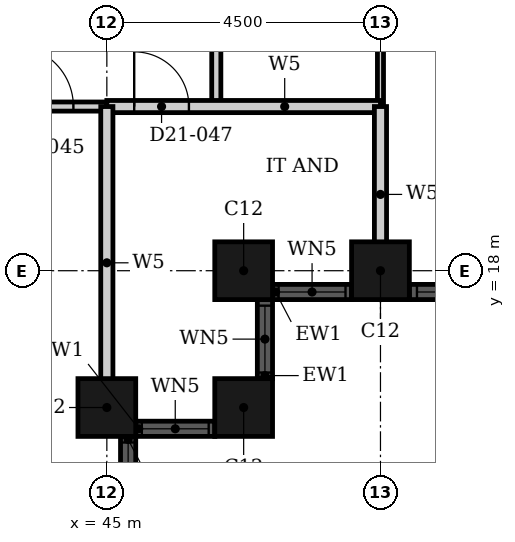
"""IFC4 building model, lengths in metres.
Left out: names, types, materials, properties, quantities, classifications, styles, units other than length and angle.
Written with IfcOpenShell. Run it as: python <this file> out.ifc"""

import sys

from ifc_helpers import new_model, si_unit, direction, frame, frame_2d, origin, origin_2d, place, context, subcontext, project, spatial, rectangle, hollow_rectangle, extrude, element, fill, save


model = new_model("IFC4")
c1 = context("Model", 3, precision=1e-05, world=origin(), true_north=direction((0.0, 1.0)))
c2 = subcontext(c1, "Body", "Model", "MODEL_VIEW")
j1 = project(units=[si_unit("LENGTHUNIT", "METRE"), si_unit("PLANEANGLEUNIT", "RADIAN")], contexts=[c1])
p1 = place(None, origin())
s1 = spatial("IfcSite", under=j1, at=p1, CompositionType="ELEMENT")
p2 = place(p1, origin())
s2 = spatial("IfcBuilding", under=s1, at=p2, CompositionType="ELEMENT")
p3 = place(p2, frame((0.0, 0.0, 88.8)))
s3 = spatial("IfcBuildingStorey", under=s2, at=p3, CompositionType="ELEMENT", Elevation=88.8)
for number, where, z_axis, x_axis in (
    (1, (45.0, 15.75, 0.0), (0.0, 0.0, 1.0), (1.0, 0.0, 0.0)),
    (2, (47.25, 15.75, 0.0), (0.0, 0.0, 1.0), (1.0, 0.0, 0.0)),
    (3, (47.25, 18.0, 0.0), (0.0, 0.0, 1.0), (1.0, 0.0, 0.0)),
    (4, (49.5, 18.0, 0.0), (0.0, 0.0, 1.0), (1.0, 0.0, 0.0)),
):
    element("IfcColumn", number, at=place(p3, frame(where, z_axis=z_axis, x_axis=x_axis)), inside=s3, PredefinedType="COLUMN", context=c2, shape_type="SweptSolid", body=[
        extrude(hollow_rectangle(XDim=0.95, YDim=0.95, WallThickness=0.03, at=origin_2d()), origin(), (0.0, 0.0, 1.0), 3.6),
    ])
p4 = place(p3, frame((45.35, 13.975, 0.0), z_axis=(0.0, 0.0, 1.0), x_axis=(0.0, 1.0, 0.0)))
e5 = element("IfcWall", 5, at=p4, inside=s3, PredefinedType="SOLIDWALL", context=c2, shape_type="SweptSolid", body=[
    extrude(rectangle(XDim=1.3, YDim=0.25, at=frame_2d((0.65, 0.0))), origin(), (0.0, 0.0, 1.0), 3.6),
])
p5 = place(p4, frame((0.1, 0.0, 0.9)))
e6 = element("IfcOpeningElement", 6, at=p5, cuts=e5, PredefinedType="OPENING", context=c2, shape_type="SweptSolid", body=[
    extrude(rectangle(XDim=1.1, YDim=2.08, at=frame_2d((0.55, 1.04))), frame((0.0, 0.135, 0.0), z_axis=(0.0, -1.0, 0.0), x_axis=(1.0, 0.0, 0.0)), (0.0, 0.0, 1.0), 0.27),
])
p6 = place(p3, frame((45.475, 15.4, 0.0), z_axis=(0.0, 0.0, 1.0), x_axis=(1.0, 0.0, 0.0)))
e7 = element("IfcWall", 7, at=p6, inside=s3, PredefinedType="SOLIDWALL", context=c2, shape_type="SweptSolid", body=[
    extrude(rectangle(XDim=1.3, YDim=0.25, at=frame_2d((0.65, 0.0))), origin(), (0.0, 0.0, 1.0), 3.6),
])
p7 = place(p6, frame((0.1, 0.0, 0.9)))
e8 = element("IfcOpeningElement", 8, at=p7, cuts=e7, PredefinedType="OPENING", context=c2, shape_type="SweptSolid", body=[
    extrude(rectangle(XDim=1.1, YDim=2.08, at=frame_2d((0.55, 1.04))), frame((0.0, 0.135, 0.0), z_axis=(0.0, -1.0, 0.0), x_axis=(1.0, 0.0, 0.0)), (0.0, 0.0, 1.0), 0.27),
])
p8 = place(p3, frame((47.6, 16.225, 0.0), z_axis=(0.0, 0.0, 1.0), x_axis=(0.0, 1.0, 0.0)))
e9 = element("IfcWall", 9, at=p8, inside=s3, PredefinedType="SOLIDWALL", context=c2, shape_type="SweptSolid", body=[
    extrude(rectangle(XDim=1.3, YDim=0.25, at=frame_2d((0.65, 0.0))), origin(), (0.0, 0.0, 1.0), 3.6),
])
p9 = place(p8, frame((0.1, 0.0, 0.9)))
e10 = element("IfcOpeningElement", 10, at=p9, cuts=e9, PredefinedType="OPENING", context=c2, shape_type="SweptSolid", body=[
    extrude(rectangle(XDim=1.1, YDim=2.08, at=frame_2d((0.55, 1.04))), frame((0.0, 0.135, 0.0), z_axis=(0.0, -1.0, 0.0), x_axis=(1.0, 0.0, 0.0)), (0.0, 0.0, 1.0), 0.27),
])
p10 = place(p3, frame((47.725, 17.65, 0.0), z_axis=(0.0, 0.0, 1.0), x_axis=(1.0, 0.0, 0.0)))
e11 = element("IfcWall", 11, at=p10, inside=s3, PredefinedType="SOLIDWALL", context=c2, shape_type="SweptSolid", body=[
    extrude(rectangle(XDim=1.3, YDim=0.25, at=frame_2d((0.65, 0.0))), origin(), (0.0, 0.0, 1.0), 3.6),
])
p11 = place(p10, frame((0.1, 0.0, 0.9)))
e12 = element("IfcOpeningElement", 12, at=p11, cuts=e11, PredefinedType="OPENING", context=c2, shape_type="SweptSolid", body=[
    extrude(rectangle(XDim=1.1, YDim=2.08, at=frame_2d((0.55, 1.04))), frame((0.0, 0.135, 0.0), z_axis=(0.0, -1.0, 0.0), x_axis=(1.0, 0.0, 0.0)), (0.0, 0.0, 1.0), 0.27),
])
p12 = place(p3, frame((49.975, 17.65, 0.0), z_axis=(0.0, 0.0, 1.0), x_axis=(1.0, 0.0, 0.0)))
e13 = element("IfcWall", 13, at=p12, inside=s3, PredefinedType="SOLIDWALL", context=c2, shape_type="SweptSolid", body=[
    extrude(rectangle(XDim=8.05, YDim=0.25, at=frame_2d((4.025, 0.0))), origin(), (0.0, 0.0, 1.0), 3.6),
])
p13 = place(p12, frame((0.125, 0.0, 0.9)))
e14 = element("IfcOpeningElement", 14, at=p13, cuts=e13, PredefinedType="OPENING", context=c2, shape_type="SweptSolid", body=[
    extrude(rectangle(XDim=3.3, YDim=2.08, at=frame_2d((1.65, 1.04))), frame((0.0, 0.135, 0.0), z_axis=(0.0, -1.0, 0.0), x_axis=(1.0, 0.0, 0.0)), (0.0, 0.0, 1.0), 0.27),
])
p14 = place(p12, frame((4.625, 0.0, 0.9)))
e15 = element("IfcOpeningElement", 15, at=p14, cuts=e13, PredefinedType="OPENING", context=c2, shape_type="SweptSolid", body=[
    extrude(rectangle(XDim=3.3, YDim=2.08, at=frame_2d((1.65, 1.04))), frame((0.0, 0.135, 0.0), z_axis=(0.0, -1.0, 0.0), x_axis=(1.0, 0.0, 0.0)), (0.0, 0.0, 1.0), 0.27),
])
p15 = place(p3, frame((31.5, 20.7, 0.0), z_axis=(0.0, 0.0, 1.0), x_axis=(1.0, 0.0, 0.0)))
e16 = element("IfcWall", 16, at=p15, inside=s3, PredefinedType="PARTITIONING", context=c2, shape_type="SweptSolid", body=[
    extrude(rectangle(XDim=13.5, YDim=0.15, at=frame_2d((6.75, 0.0))), origin(), (0.0, 0.0, 1.0), 3.3),
])
p16 = place(p15, frame((11.95, 0.0, 0.0)))
e17 = element("IfcOpeningElement", 17, at=p16, cuts=e16, PredefinedType="OPENING", context=c2, shape_type="SweptSolid", body=[
    extrude(rectangle(XDim=1.0, YDim=2.1, at=frame_2d((0.5, 1.05))), frame((0.0, 0.085, 0.0), z_axis=(0.0, -1.0, 0.0), x_axis=(1.0, 0.0, 0.0)), (0.0, 0.0, 1.0), 0.17),
])
p17 = place(p15, frame((1.05, 0.0, 0.0)))
e18 = element("IfcOpeningElement", 18, at=p17, cuts=e16, PredefinedType="OPENING", context=c2, shape_type="SweptSolid", body=[
    extrude(rectangle(XDim=0.9, YDim=2.1, at=frame_2d((0.45, 1.05))), frame((0.0, 0.085, 0.0), z_axis=(0.0, -1.0, 0.0), x_axis=(1.0, 0.0, 0.0)), (0.0, 0.0, 1.0), 0.17),
])
p18 = place(p15, frame((5.55, 0.0, 0.0)))
e19 = element("IfcOpeningElement", 19, at=p18, cuts=e16, PredefinedType="OPENING", context=c2, shape_type="SweptSolid", body=[
    extrude(rectangle(XDim=0.9, YDim=2.1, at=frame_2d((0.45, 1.05))), frame((0.0, 0.085, 0.0), z_axis=(0.0, -1.0, 0.0), x_axis=(1.0, 0.0, 0.0)), (0.0, 0.0, 1.0), 0.17),
])
p19 = place(p3, frame((46.8, 20.7, 0.0), z_axis=(0.0, 0.0, 1.0), x_axis=(0.0, 1.0, 0.0)))
e20 = element("IfcWall", 20, at=p19, inside=s3, PredefinedType="PARTITIONING", context=c2, shape_type="SweptSolid", body=[
    extrude(rectangle(XDim=6.3, YDim=0.15, at=frame_2d((3.15, 0.0))), origin(), (0.0, 0.0, 1.0), 3.3),
])
p20 = place(p19, frame((2.65, 0.0, 0.0)))
e21 = element("IfcOpeningElement", 21, at=p20, cuts=e20, PredefinedType="OPENING", context=c2, shape_type="SweptSolid", body=[
    extrude(rectangle(XDim=0.9, YDim=2.1, at=frame_2d((0.45, 1.05))), frame((0.0, 0.085, 0.0), z_axis=(0.0, -1.0, 0.0), x_axis=(1.0, 0.0, 0.0)), (0.0, 0.0, 1.0), 0.17),
])
p21 = place(p3, frame((49.5, 20.7, 0.0), z_axis=(0.0, 0.0, 1.0), x_axis=(0.0, 1.0, 0.0)))
e22 = element("IfcWall", 22, at=p21, inside=s3, PredefinedType="PARTITIONING", context=c2, shape_type="SweptSolid", body=[
    extrude(rectangle(XDim=6.3, YDim=0.1, at=frame_2d((3.15, 0.0))), origin(), (0.0, 0.0, 1.0), 2.38),
])
p22 = place(p3, frame((45.0, 20.7, 0.0), z_axis=(0.0, 0.0, 1.0), x_axis=(1.0, 0.0, 0.0)))
e23 = element("IfcWall", 23, at=p22, inside=s3, PredefinedType="PARTITIONING", context=c2, shape_type="SweptSolid", body=[
    extrude(rectangle(XDim=4.5, YDim=0.2, at=frame_2d((2.25, 0.0))), origin(), (0.0, 0.0, 1.0), 3.3),
])
p23 = place(p22, frame((0.45, 0.0, 0.0)))
e24 = element("IfcOpeningElement", 24, at=p23, cuts=e23, PredefinedType="OPENING", context=c2, shape_type="SweptSolid", body=[
    extrude(rectangle(XDim=0.9, YDim=2.1, at=frame_2d((0.45, 1.05))), frame((0.0, 0.11, 0.0), z_axis=(0.0, -1.0, 0.0), x_axis=(1.0, 0.0, 0.0)), (0.0, 0.0, 1.0), 0.22),
])
p24 = place(p3, frame((45.0, 15.56, 0.0), z_axis=(0.0, 0.0, 1.0), x_axis=(0.0, 1.0, 0.0)))
e25 = element("IfcWall", 25, at=p24, inside=s3, PredefinedType="PARTITIONING", context=c2, shape_type="SweptSolid", body=[
    extrude(rectangle(XDim=5.14, YDim=0.2, at=frame_2d((2.57, 0.0))), origin(), (0.0, 0.0, 1.0), 3.3),
])
p25 = place(p3, frame((49.5, 17.81, 0.0), z_axis=(0.0, 0.0, 1.0), x_axis=(0.0, 1.0, 0.0)))
e26 = element("IfcWall", 26, at=p25, inside=s3, PredefinedType="PARTITIONING", context=c2, shape_type="SweptSolid", body=[
    extrude(rectangle(XDim=2.89, YDim=0.2, at=frame_2d((1.445, 0.0))), origin(), (0.0, 0.0, 1.0), 2.38),
])
p26 = place(p5, origin())
e27 = element("IfcWindow", 27, at=p26, inside=s3, PartitioningType="SINGLE_PANEL", PredefinedType="WINDOW", context=c2, shape_type="SweptSolid", body=[
    extrude(rectangle(XDim=1.1, YDim=2.08, at=frame_2d((0.55, 1.04))), frame((0.0, 0.03, 0.0), z_axis=(0.0, -1.0, 0.0), x_axis=(1.0, 0.0, 0.0)), (0.0, 0.0, 1.0), 0.06),
])
fill(e6, e27)
p27 = place(p7, origin())
e28 = element("IfcWindow", 28, at=p27, inside=s3, PartitioningType="SINGLE_PANEL", PredefinedType="WINDOW", context=c2, shape_type="SweptSolid", body=[
    extrude(rectangle(XDim=1.1, YDim=2.08, at=frame_2d((0.55, 1.04))), frame((0.0, 0.03, 0.0), z_axis=(0.0, -1.0, 0.0), x_axis=(1.0, 0.0, 0.0)), (0.0, 0.0, 1.0), 0.06),
])
fill(e8, e28)
p28 = place(p9, origin())
e29 = element("IfcWindow", 29, at=p28, inside=s3, PartitioningType="SINGLE_PANEL", PredefinedType="WINDOW", context=c2, shape_type="SweptSolid", body=[
    extrude(rectangle(XDim=1.1, YDim=2.08, at=frame_2d((0.55, 1.04))), frame((0.0, 0.03, 0.0), z_axis=(0.0, -1.0, 0.0), x_axis=(1.0, 0.0, 0.0)), (0.0, 0.0, 1.0), 0.06),
])
fill(e10, e29)
p29 = place(p11, origin())
e30 = element("IfcWindow", 30, at=p29, inside=s3, PartitioningType="SINGLE_PANEL", PredefinedType="WINDOW", context=c2, shape_type="SweptSolid", body=[
    extrude(rectangle(XDim=1.1, YDim=2.08, at=frame_2d((0.55, 1.04))), frame((0.0, 0.03, 0.0), z_axis=(0.0, -1.0, 0.0), x_axis=(1.0, 0.0, 0.0)), (0.0, 0.0, 1.0), 0.06),
])
fill(e12, e30)
p30 = place(p13, origin())
e31 = element("IfcWindow", 31, at=p30, inside=s3, PartitioningType="SINGLE_PANEL", PredefinedType="WINDOW", context=c2, shape_type="SweptSolid", body=[
    extrude(rectangle(XDim=3.3, YDim=2.08, at=frame_2d((1.65, 1.04))), frame((0.0, 0.03, 0.0), z_axis=(0.0, -1.0, 0.0), x_axis=(1.0, 0.0, 0.0)), (0.0, 0.0, 1.0), 0.06),
])
fill(e14, e31)
p31 = place(p16, origin())
e32 = element("IfcDoor", 32, at=p31, inside=s3, OperationType="SINGLE_SWING_RIGHT", PredefinedType="DOOR", context=c2, shape_type="SweptSolid", body=[
    extrude(rectangle(XDim=1.0, YDim=2.1, at=frame_2d((0.5, 1.05))), frame((0.0, 0.025, 0.0), z_axis=(0.0, -1.0, 0.0), x_axis=(1.0, 0.0, 0.0)), (0.0, 0.0, 1.0), 0.05),
])
fill(e17, e32)
p32 = place(p23, origin())
e33 = element("IfcDoor", 33, at=p32, inside=s3, OperationType="SINGLE_SWING_RIGHT", PredefinedType="DOOR", context=c2, shape_type="SweptSolid", body=[
    extrude(rectangle(XDim=0.9, YDim=2.1, at=frame_2d((0.45, 1.05))), frame((0.0, 0.025, 0.0), z_axis=(0.0, -1.0, 0.0), x_axis=(1.0, 0.0, 0.0)), (0.0, 0.0, 1.0), 0.05),
])
fill(e24, e33)
save(model, sys.argv[1])
